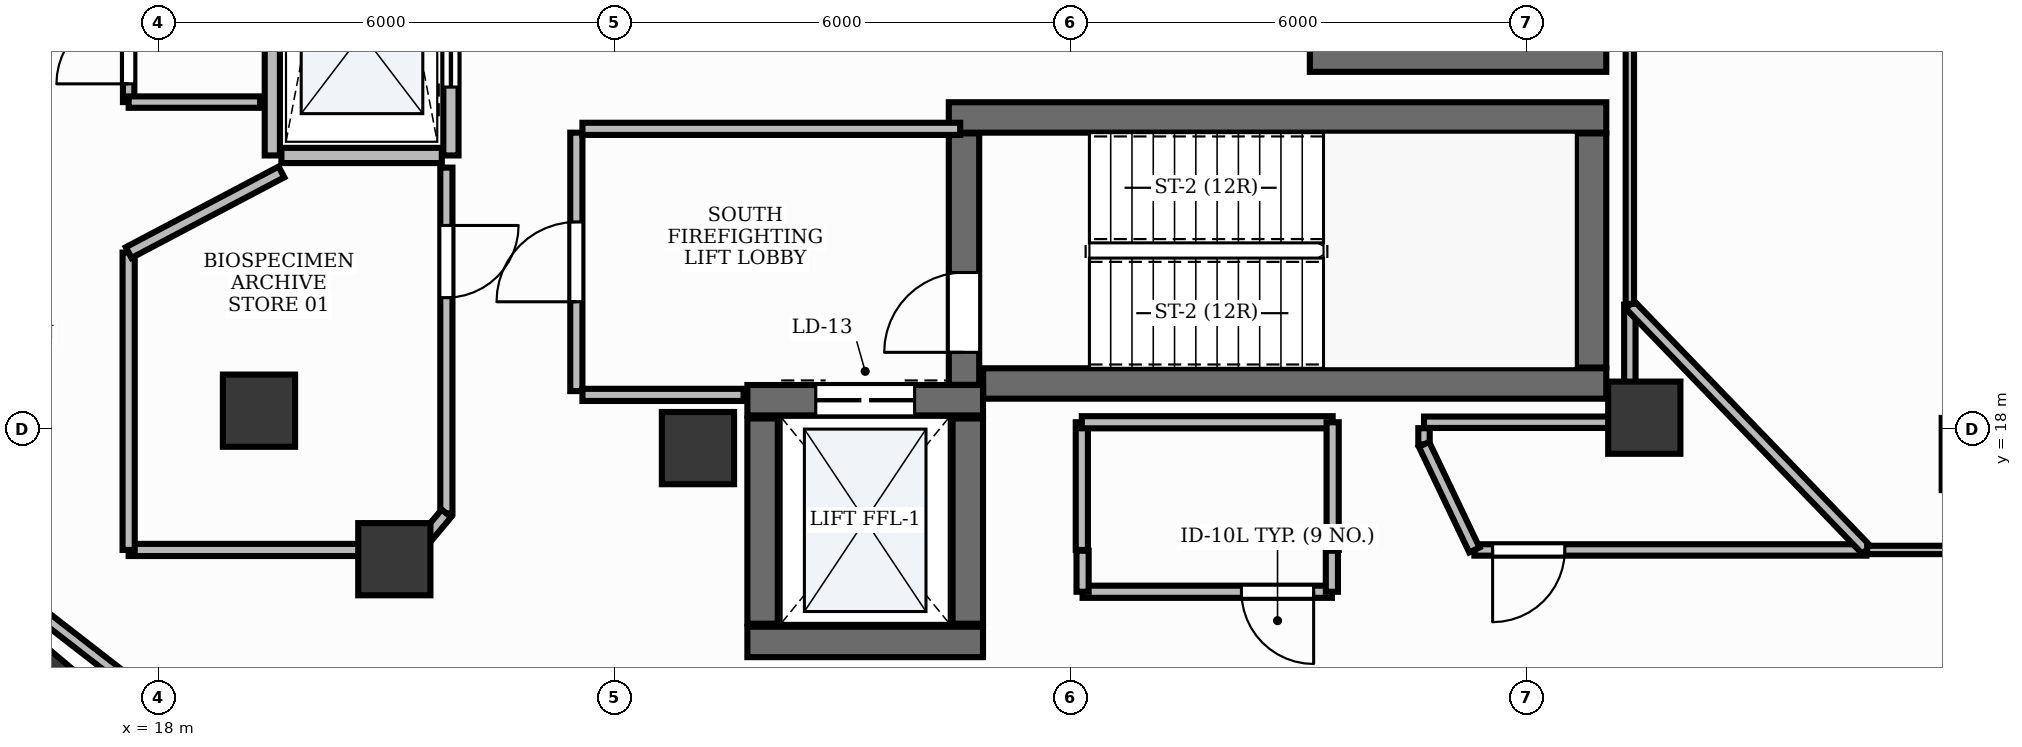
"""IFC4 building model, lengths in metres.
Left out: names, types, materials, properties, quantities, classifications, styles, units other than length and angle.
Written with IfcOpenShell. Run it as: python <this file> out.ifc"""

import sys

from ifc_helpers import new_model, si_unit, direction, frame, frame_2d, origin, origin_2d, place, context, subcontext, project, spatial, rectangle, extrude, element, fill, save


model = new_model("IFC4")
c1 = context("Model", 3, precision=1e-05, world=origin(), true_north=direction((0.0, 1.0)))
c2 = subcontext(c1, "Body", "Model", "MODEL_VIEW")
j1 = project(units=[si_unit("LENGTHUNIT", "METRE"), si_unit("PLANEANGLEUNIT", "RADIAN")], contexts=[c1])
p1 = place(None, origin())
s1 = spatial("IfcSite", under=j1, at=p1, CompositionType="ELEMENT")
p2 = place(p1, origin())
s2 = spatial("IfcBuilding", under=s1, at=p2, CompositionType="ELEMENT")
p3 = place(p2, frame((0.0, 0.0, 200.4)))
s3 = spatial("IfcBuildingStorey", under=s2, at=p3, CompositionType="ELEMENT", Elevation=200.4)
p4 = place(p3, frame((28.852, 18.6, 0.0), z_axis=(0.0, 0.0, 1.0), x_axis=(1.0, 0.0, 0.0)))
e1 = element("IfcWall", 1, at=p4, inside=s3, PredefinedType="SHEAR", context=c2, shape_type="SweptSolid", body=[
    extrude(rectangle(XDim=8.198, YDim=0.4, at=frame_2d((4.099, 0.0))), origin(), (0.0, 0.0, 1.0), 3.9),
])
p5 = place(p3, frame((28.4, 22.1, 0.0), z_axis=(0.0, 0.0, 1.0), x_axis=(1.0, 0.0, 0.0)))
e2 = element("IfcWall", 2, at=p5, inside=s3, PredefinedType="SHEAR", context=c2, shape_type="SweptSolid", body=[
    extrude(rectangle(XDim=8.65, YDim=0.4, at=frame_2d((4.325, 0.0))), origin(), (0.0, 0.0, 1.0), 3.9),
])
p6 = place(p3, frame((36.85, 18.81, 0.0), z_axis=(0.0, 0.0, 1.0), x_axis=(0.0, 1.0, 0.0)))
e3 = element("IfcWall", 3, at=p6, inside=s3, PredefinedType="SHEAR", context=c2, shape_type="SweptSolid", body=[
    extrude(rectangle(XDim=3.08, YDim=0.4, at=frame_2d((1.54, 0.0))), origin(), (0.0, 0.0, 1.0), 3.9),
])
p7 = place(p3, frame((28.6, 18.582, 0.0), z_axis=(0.0, 0.0, 1.0), x_axis=(0.0, 1.0, 0.0)))
e4 = element("IfcWall", 4, at=p7, inside=s3, PredefinedType="SHEAR", context=c2, shape_type="SweptSolid", body=[
    extrude(rectangle(XDim=3.308, YDim=0.4, at=frame_2d((1.654, 0.0))), origin(), (0.0, 0.0, 1.0), 3.9),
])
p8 = place(p7, frame((0.428, 0.0, 0.0)))
e5 = element("IfcOpeningElement", 5, at=p8, cuts=e4, PredefinedType="OPENING", context=c2, shape_type="SweptSolid", body=[
    extrude(rectangle(XDim=1.05, YDim=2.15, at=frame_2d((0.525, 1.075))), frame((0.0, 0.215, 0.0), z_axis=(0.0, -1.0, 0.0), x_axis=(1.0, 0.0, 0.0)), (0.0, 0.0, 1.0), 0.43),
])
p9 = place(p3, frame((33.15, 22.9, 0.0), z_axis=(0.0, 0.0, 1.0), x_axis=(1.0, 0.0, 0.0)))
e6 = element("IfcWall", 6, at=p9, inside=s3, PredefinedType="SHEAR", context=c2, shape_type="SweptSolid", body=[
    extrude(rectangle(XDim=3.9, YDim=0.4, at=frame_2d((1.95, 0.0))), origin(), (0.0, 0.0, 1.0), 3.9),
])
p10 = place(p3, frame((25.75, 15.2, 0.0), z_axis=(0.0, 0.0, 1.0), x_axis=(1.0, 0.0, 0.0)))
e7 = element("IfcWall", 7, at=p10, inside=s3, PredefinedType="SHEAR", context=c2, shape_type="SweptSolid", body=[
    extrude(rectangle(XDim=3.1, YDim=0.4, at=frame_2d((1.55, 0.0))), origin(), (0.0, 0.0, 1.0), 3.9),
])
p11 = place(p3, frame((25.75, 18.38, 0.0), z_axis=(0.0, 0.0, 1.0), x_axis=(1.0, 0.0, 0.0)))
e8 = element("IfcWall", 8, at=p11, inside=s3, PredefinedType="SHEAR", context=c2, shape_type="SweptSolid", body=[
    extrude(rectangle(XDim=3.1, YDim=0.4, at=frame_2d((1.55, 0.0))), origin(), (0.0, 0.0, 1.0), 3.9),
])
p12 = place(p11, frame((0.9, 0.0, 0.0)))
e9 = element("IfcOpeningElement", 9, at=p12, cuts=e8, PredefinedType="OPENING", context=c2, shape_type="SweptSolid", body=[
    extrude(rectangle(XDim=1.3, YDim=2.2, at=frame_2d((0.65, 1.1))), frame((0.0, 0.215, 0.0), z_axis=(0.0, -1.0, 0.0), x_axis=(1.0, 0.0, 0.0)), (0.0, 0.0, 1.0), 0.43),
])
for number, where, z_axis, x_axis in (
    (10, (25.95, 15.44, 0.0), (0.0, 0.0, 1.0), (0.0, 1.0, 0.0)),
    (11, (28.65, 15.44, 0.0), (0.0, 0.0, 1.0), (0.0, 1.0, 0.0)),
):
    element("IfcWall", number, at=place(p3, frame(where, z_axis=z_axis, x_axis=x_axis)), inside=s3, PredefinedType="SHEAR", context=c2, shape_type="SweptSolid", body=[
        extrude(rectangle(XDim=2.7, YDim=0.4, at=frame_2d((1.35, 0.0))), origin(), (0.0, 0.0, 1.0), 3.9),
    ])
for number, where, z_axis, x_axis in (
    (12, (25.1, 17.75, -0.0), (0.0, 0.0, 1.0), (1.0, 0.0, 0.0)),
    (13, (37.55, 18.15, -0.0), (0.0, 0.0, 1.0), (1.0, 0.0, 0.0)),
):
    element("IfcColumn", number, at=place(p3, frame(where, z_axis=z_axis, x_axis=x_axis)), inside=s3, PredefinedType="PILASTER", context=c2, shape_type="SweptSolid", body=[
        extrude(rectangle(XDim=0.95, YDim=0.95, at=origin_2d()), origin(), (0.0, 0.0, 1.0), 3.901),
    ])
p13 = place(p3, frame((19.325, 18.242, -0.0), z_axis=(0.0, 0.0, 1.0), x_axis=(1.0, 0.0, 0.0)))
e14 = element("IfcColumn", 14, at=p13, inside=s3, PredefinedType="COLUMN", context=c2, shape_type="SweptSolid", body=[
    extrude(rectangle(XDim=0.95, YDim=0.95, at=origin_2d()), origin(), (0.0, 0.0, 1.0), 3.901),
])
p14 = place(p3, frame((16.416, 14.573, -0.0), z_axis=(0.0, 0.0, 1.0), x_axis=(-0.764246456939, 0.644924300253, 0.0)))
e15 = element("IfcColumn", 15, at=p14, inside=s3, PredefinedType="COLUMN", context=c2, shape_type="SweptSolid", body=[
    extrude(rectangle(XDim=1.0, YDim=1.0, at=origin_2d()), origin(), (0.0, 0.0, 1.0), 3.901),
])
for number, where, z_axis, x_axis in (
    (16, (21.105, 16.288, -0.0), (0.0, 0.0, 1.0), (1.0, 0.0, 0.0)),
    (17, (41.938, 17.672, -0.0), (0.0, 0.0, 1.0), (1.0, 0.0, 0.0)),
):
    element("IfcColumn", number, at=place(p3, frame(where, z_axis=z_axis, x_axis=x_axis)), inside=s3, PredefinedType="COLUMN", context=c2, shape_type="SweptSolid", body=[
        extrude(rectangle(XDim=0.95, YDim=0.95, at=origin_2d()), origin(), (0.0, 0.0, 1.0), 3.901),
    ])
p15 = place(p3, frame((19.5, 21.6, 0.0), z_axis=(0.0, 0.0, 1.0), x_axis=(0.0, 1.0, 0.0)))
e18 = element("IfcWall", 18, at=p15, inside=s3, PredefinedType="PARTITIONING", context=c2, shape_type="SweptSolid", body=[
    extrude(rectangle(XDim=10.8, YDim=0.2, at=frame_2d((5.4, 0.0))), origin(), (0.0, 0.0, 1.0), 2.91),
])
p16 = place(p3, frame((21.85, 21.6, 0.0), z_axis=(0.0, 0.0, 1.0), x_axis=(0.0, 1.0, 0.0)))
e19 = element("IfcWall", 19, at=p16, inside=s3, PredefinedType="PARTITIONING", context=c2, shape_type="SweptSolid", body=[
    extrude(rectangle(XDim=10.8, YDim=0.2, at=frame_2d((5.4, 0.0))), origin(), (0.0, 0.0, 1.0), 2.91),
])
p17 = place(p16, frame((0.9, 0.0, 0.0)))
e20 = element("IfcOpeningElement", 20, at=p17, cuts=e19, PredefinedType="OPENING", context=c2, shape_type="SweptSolid", body=[
    extrude(rectangle(XDim=1.1, YDim=2.2, at=frame_2d((0.55, 1.1))), frame((0.0, 0.115, 0.0), z_axis=(0.0, -1.0, 0.0), x_axis=(1.0, 0.0, 0.0)), (0.0, 0.0, 1.0), 0.23),
])
p18 = place(p16, frame((3.6, 0.0, 0.0)))
e21 = element("IfcOpeningElement", 21, at=p18, cuts=e19, PredefinedType="OPENING", context=c2, shape_type="SweptSolid", body=[
    extrude(rectangle(XDim=1.1, YDim=2.2, at=frame_2d((0.55, 1.1))), frame((0.0, 0.115, 0.0), z_axis=(0.0, -1.0, 0.0), x_axis=(1.0, 0.0, 0.0)), (0.0, 0.0, 1.0), 0.23),
])
p19 = place(p16, frame((6.3, 0.0, 0.0)))
e22 = element("IfcOpeningElement", 22, at=p19, cuts=e19, PredefinedType="OPENING", context=c2, shape_type="SweptSolid", body=[
    extrude(rectangle(XDim=1.1, YDim=2.2, at=frame_2d((0.55, 1.1))), frame((0.0, 0.115, 0.0), z_axis=(0.0, -1.0, 0.0), x_axis=(1.0, 0.0, 0.0)), (0.0, 0.0, 1.0), 0.23),
])
p20 = place(p16, frame((9.0, 0.0, 0.0)))
e23 = element("IfcOpeningElement", 23, at=p20, cuts=e19, PredefinedType="OPENING", context=c2, shape_type="SweptSolid", body=[
    extrude(rectangle(XDim=1.1, YDim=2.2, at=frame_2d((0.55, 1.1))), frame((0.0, 0.115, 0.0), z_axis=(0.0, -1.0, 0.0), x_axis=(1.0, 0.0, 0.0)), (0.0, 0.0, 1.0), 0.23),
])
p21 = place(p3, frame((19.62, 21.6, 0.0), z_axis=(0.0, 0.0, 1.0), x_axis=(1.0, 0.0, 0.0)))
e24 = element("IfcWall", 24, at=p21, inside=s3, PredefinedType="PARTITIONING", context=c2, shape_type="SweptSolid", body=[
    extrude(rectangle(XDim=2.11, YDim=0.2, at=frame_2d((1.055, 0.0))), origin(), (0.0, 0.0, 1.0), 2.91),
])
p22 = place(p3, frame((23.5, 18.5, 0.0), z_axis=(0.0, 0.0, 1.0), x_axis=(0.0, 1.0, 0.0)))
e25 = element("IfcWall", 25, at=p22, inside=s3, PredefinedType="PARTITIONING", context=c2, shape_type="SweptSolid", body=[
    extrude(rectangle(XDim=3.4, YDim=0.16, at=frame_2d((1.7, 0.0))), origin(), (0.0, 0.0, 1.0), 2.91),
])
p23 = place(p22, frame((1.175, 0.0, 0.0)))
e26 = element("IfcOpeningElement", 26, at=p23, cuts=e25, PredefinedType="OPENING", context=c2, shape_type="SweptSolid", body=[
    extrude(rectangle(XDim=1.05, YDim=2.15, at=frame_2d((0.525, 1.075))), frame((0.0, 0.095, 0.0), z_axis=(0.0, -1.0, 0.0), x_axis=(1.0, 0.0, 0.0)), (0.0, 0.0, 1.0), 0.19),
])
p24 = place(p3, frame((23.58, 21.95, 0.0), z_axis=(0.0, 0.0, 1.0), x_axis=(1.0, 0.0, 0.0)))
e27 = element("IfcWall", 27, at=p24, inside=s3, PredefinedType="PARTITIONING", context=c2, shape_type="SweptSolid", body=[
    extrude(rectangle(XDim=4.97, YDim=0.16, at=frame_2d((2.485, 0.0))), origin(), (0.0, 0.0, 1.0), 2.91),
])
p25 = place(p3, frame((23.58, 18.45, 0.0), z_axis=(0.0, 0.0, 1.0), x_axis=(1.0, 0.0, 0.0)))
e28 = element("IfcWall", 28, at=p25, inside=s3, PredefinedType="PARTITIONING", context=c2, shape_type="SweptSolid", body=[
    extrude(rectangle(XDim=2.12, YDim=0.16, at=frame_2d((1.06, 0.0))), origin(), (0.0, 0.0, 1.0), 2.91),
])
p26 = place(p3, frame((33.44, 15.86, 0.0), z_axis=(0.0, 0.0, 1.0), x_axis=(-1.0, 0.0, 0.0)))
e29 = element("IfcWall", 29, at=p26, inside=s3, PredefinedType="PARTITIONING", context=c2, shape_type="SweptSolid", body=[
    extrude(rectangle(XDim=3.28, YDim=0.16, at=frame_2d((1.64, 0.0))), origin(), (0.0, 0.0, 1.0), 2.91),
])
p27 = place(p26, frame((0.24, 0.0, 0.0)))
e30 = element("IfcOpeningElement", 30, at=p27, cuts=e29, PredefinedType="OPENING", context=c2, shape_type="SweptSolid", body=[
    extrude(rectangle(XDim=0.95, YDim=2.15, at=frame_2d((0.475, 1.075))), frame((0.0, 0.095, 0.0), z_axis=(0.0, -1.0, 0.0), x_axis=(1.0, 0.0, 0.0)), (0.0, 0.0, 1.0), 0.19),
])
p28 = place(p3, frame((21.79, 21.44, 0.0), z_axis=(0.0, 0.0, 1.0), x_axis=(0.0, -1.0, 0.0)))
e31 = element("IfcWall", 31, at=p28, inside=s3, PredefinedType="PARTITIONING", context=c2, shape_type="SweptSolid", body=[
    extrude(rectangle(XDim=4.549, YDim=0.16, at=frame_2d((2.274, 0.0))), origin(), (0.0, 0.0, 1.0), 2.91),
])
p29 = place(p28, frame((0.761, 0.0, 0.0)))
e32 = element("IfcOpeningElement", 32, at=p29, cuts=e31, PredefinedType="OPENING", context=c2, shape_type="SweptSolid", body=[
    extrude(rectangle(XDim=0.95, YDim=2.15, at=frame_2d((0.475, 1.075))), frame((0.0, 0.095, 0.0), z_axis=(0.0, -1.0, 0.0), x_axis=(1.0, 0.0, 0.0)), (0.0, 0.0, 1.0), 0.19),
])
p30 = place(p3, frame((40.472, 16.41, 0.0), z_axis=(0.0, 0.0, 1.0), x_axis=(-1.0, 0.0, 0.0)))
e33 = element("IfcWall", 33, at=p30, inside=s3, PredefinedType="PARTITIONING", context=c2, shape_type="SweptSolid", body=[
    extrude(rectangle(XDim=5.157, YDim=0.15, at=frame_2d((2.579, 0.0))), origin(), (0.0, 0.0, 1.0), 2.91),
])
p31 = place(p30, frame((3.968, 0.0, 0.0)))
e34 = element("IfcOpeningElement", 34, at=p31, cuts=e33, PredefinedType="OPENING", context=c2, shape_type="SweptSolid", body=[
    extrude(rectangle(XDim=0.95, YDim=2.15, at=frame_2d((0.475, 1.075))), frame((0.0, 0.09, 0.0), z_axis=(0.0, -1.0, 0.0), x_axis=(1.0, 0.0, 0.0)), (0.0, 0.0, 1.0), 0.18),
])
p32 = place(p3, frame((17.61, 22.302, 0.0), z_axis=(0.0, 0.0, 1.0), x_axis=(0.0, 1.0, 0.0)))
e35 = element("IfcWall", 35, at=p32, inside=s3, PredefinedType="PARTITIONING", context=c2, shape_type="SweptSolid", body=[
    extrude(rectangle(XDim=9.488, YDim=0.15, at=frame_2d((4.744, 0.0))), origin(), (0.0, 0.0, 1.0), 2.91),
])
p33 = place(p32, frame((0.24, 0.0, 0.0)))
e36 = element("IfcOpeningElement", 36, at=p33, cuts=e35, PredefinedType="OPENING", context=c2, shape_type="SweptSolid", body=[
    extrude(rectangle(XDim=0.95, YDim=2.15, at=frame_2d((0.475, 1.075))), frame((0.0, 0.09, 0.0), z_axis=(0.0, -1.0, 0.0), x_axis=(1.0, 0.0, 0.0)), (0.0, 0.0, 1.0), 0.18),
])
for number, where, z_axis, x_axis in (
    (37, (33.44, 16.4, 0.0), (0.0, 0.0, 1.0), (0.0, -1.0, 0.0)),
    (38, (30.16, 15.86, 0.0), (0.0, 0.0, 1.0), (0.0, 1.0, 0.0)),
):
    element("IfcWall", number, at=place(p3, frame(where, z_axis=z_axis, x_axis=x_axis)), inside=s3, PredefinedType="PARTITIONING", context=c2, shape_type="SweptSolid", body=[
        extrude(rectangle(XDim=0.54, YDim=0.16, at=frame_2d((0.27, 0.0))), origin(), (0.0, 0.0, 1.0), 2.91),
    ])
p34 = place(p3, frame((30.15, 16.41, 0.0), z_axis=(0.0, 0.0, 1.0), x_axis=(0.0, 1.0, 0.0)))
e39 = element("IfcWall", 39, at=p34, inside=s3, PredefinedType="PARTITIONING", context=c2, shape_type="SweptSolid", body=[
    extrude(rectangle(XDim=1.68, YDim=0.16, at=frame_2d((0.84, 0.0))), origin(), (0.0, 0.0, 1.0), 2.91),
])
p35 = place(p3, frame((30.15, 18.09, 0.0), z_axis=(0.0, 0.0, 1.0), x_axis=(1.0, 0.0, 0.0)))
e40 = element("IfcWall", 40, at=p35, inside=s3, PredefinedType="PARTITIONING", context=c2, shape_type="SweptSolid", body=[
    extrude(rectangle(XDim=3.3, YDim=0.16, at=frame_2d((1.65, 0.0))), origin(), (0.0, 0.0, 1.0), 2.91),
])
p36 = place(p3, frame((33.45, 18.09, 0.0), z_axis=(0.0, 0.0, 1.0), x_axis=(0.0, -1.0, 0.0)))
e41 = element("IfcWall", 41, at=p36, inside=s3, PredefinedType="PARTITIONING", context=c2, shape_type="SweptSolid", body=[
    extrude(rectangle(XDim=1.68, YDim=0.16, at=frame_2d((0.84, 0.0))), origin(), (0.0, 0.0, 1.0), 2.91),
])
p37 = place(p3, frame((21.79, 16.891, 0.0), z_axis=(0.0, 0.0, 1.0), x_axis=(-0.6421333912, -0.766592921899, 0.0)))
e42 = element("IfcWall", 42, at=p37, inside=s3, PredefinedType="PARTITIONING", context=c2, shape_type="SweptSolid", body=[
    extrude(rectangle(XDim=0.628, YDim=0.16, at=frame_2d((0.314, 0.0))), origin(), (0.0, 0.0, 1.0), 2.91),
])
p38 = place(p3, frame((21.387, 16.41, 0.0), z_axis=(0.0, 0.0, 1.0), x_axis=(-1.0, 0.0, 0.0)))
e43 = element("IfcWall", 43, at=p38, inside=s3, PredefinedType="PARTITIONING", context=c2, shape_type="SweptSolid", body=[
    extrude(rectangle(XDim=3.777, YDim=0.16, at=frame_2d((1.888, 0.0))), origin(), (0.0, 0.0, 1.0), 2.91),
])
p39 = place(p3, frame((17.61, 16.41, 0.0), z_axis=(0.0, 0.0, 1.0), x_axis=(0.0, 1.0, 0.0)))
e44 = element("IfcWall", 44, at=p39, inside=s3, PredefinedType="PARTITIONING", context=c2, shape_type="SweptSolid", body=[
    extrude(rectangle(XDim=3.912, YDim=0.16, at=frame_2d((1.956, 0.0))), origin(), (0.0, 0.0, 1.0), 2.91),
])
p40 = place(p3, frame((17.61, 20.322, 0.0), z_axis=(0.0, 0.0, 1.0), x_axis=(0.884437714556, 0.466658257261, 0.0)))
e45 = element("IfcWall", 45, at=p40, inside=s3, PredefinedType="PARTITIONING", context=c2, shape_type="SweptSolid", body=[
    extrude(rectangle(XDim=2.273, YDim=0.16, at=frame_2d((1.136, 0.0))), origin(), (0.0, 0.0, 1.0), 2.91),
])
p41 = place(p3, frame((16.476, 15.551, 0.0), z_axis=(0.0, 0.0, 1.0), x_axis=(0.790344529681, -0.612662651386, 0.0)))
e46 = element("IfcWall", 46, at=p41, inside=s3, PredefinedType="PARTITIONING", context=c2, shape_type="SweptSolid", body=[
    extrude(rectangle(XDim=2.514, YDim=0.15, at=frame_2d((1.257, 0.0))), origin(), (0.0, 0.0, 1.0), 2.91),
])
p42 = place(p3, frame((34.652, 17.799, 0.0), z_axis=(0.0, 0.0, 1.0), x_axis=(0.0, 1.0, 0.0)))
e47 = element("IfcWall", 47, at=p42, inside=s3, PredefinedType="PARTITIONING", context=c2, shape_type="SweptSolid", body=[
    extrude(rectangle(XDim=0.213, YDim=0.15, at=frame_2d((0.106, 0.0))), origin(), (0.0, 0.0, 1.0), 2.91),
])
p43 = place(p3, frame((34.652, 18.09, 0.0), z_axis=(0.0, 0.0, 1.0), x_axis=(1.0, 0.0, 0.0)))
e48 = element("IfcWall", 48, at=p43, inside=s3, PredefinedType="PARTITIONING", context=c2, shape_type="SweptSolid", body=[
    extrude(rectangle(XDim=2.698, YDim=0.15, at=frame_2d((1.349, 0.0))), origin(), (0.0, 0.0, 1.0), 2.91),
])
p44 = place(p3, frame((37.36, 18.1, 0.0), z_axis=(0.0, 0.0, 1.0), x_axis=(0.0, 1.0, 0.0)))
e49 = element("IfcWall", 49, at=p44, inside=s3, PredefinedType="PARTITIONING", context=c2, shape_type="SweptSolid", body=[
    extrude(rectangle(XDim=1.537, YDim=0.15, at=frame_2d((0.769, 0.0))), origin(), (0.0, 0.0, 1.0), 2.91),
])
p45 = place(p3, frame((37.36, 19.637, 0.0), z_axis=(0.0, 0.0, 1.0), x_axis=(0.694165803971, -0.719815140573, 0.0)))
e50 = element("IfcWall", 50, at=p45, inside=s3, PredefinedType="PARTITIONING", context=c2, shape_type="SweptSolid", body=[
    extrude(rectangle(XDim=4.483, YDim=0.15, at=frame_2d((2.242, 0.0))), origin(), (0.0, 0.0, 1.0), 2.91),
])
p46 = place(p3, frame((35.315, 16.41, 0.0), z_axis=(0.0, 0.0, 1.0), x_axis=(-0.430450657863, 0.902614109764, 0.0)))
e51 = element("IfcWall", 51, at=p46, inside=s3, PredefinedType="PARTITIONING", context=c2, shape_type="SweptSolid", body=[
    extrude(rectangle(XDim=1.539, YDim=0.15, at=frame_2d((0.77, 0.0))), origin(), (0.0, 0.0, 1.0), 2.91),
])
p47 = place(p3, frame((44.5, 16.41, 0.0), z_axis=(0.0, 0.0, 1.0), x_axis=(-1.0, 0.0, 0.0)))
e52 = element("IfcWall", 52, at=p47, inside=s3, PredefinedType="MOVABLE", context=c2, shape_type="SweptSolid", body=[
    extrude(rectangle(XDim=4.018, YDim=0.11, at=frame_2d((2.009, 0.0))), origin(), (0.0, 0.0, 1.0), 2.91),
])
p48 = place(p3, frame((37.36, 19.647, 0.0), z_axis=(0.0, 0.0, 1.0), x_axis=(0.0, 1.0, 0.0)))
e53 = element("IfcWall", 53, at=p48, inside=s3, PredefinedType="MOVABLE", context=c2, shape_type="SweptSolid", body=[
    extrude(rectangle(XDim=8.465, YDim=0.11, at=frame_2d((4.232, 0.0))), origin(), (0.0, 0.0, 1.0), 2.91),
])
p49 = place(p3, frame((19.34, 22.302, 0.0), z_axis=(0.0, 0.0, 1.0), x_axis=(-1.0, 0.0, 0.0)))
e54 = element("IfcWall", 54, at=p49, inside=s3, PredefinedType="PARTITIONING", context=c2, shape_type="SweptSolid", body=[
    extrude(rectangle(XDim=1.73, YDim=0.15, at=frame_2d((0.865, 0.0))), origin(), (0.0, 0.0, 1.0), 2.91),
])
p50 = place(p8, origin())
e55 = element("IfcDoor", 55, at=p50, inside=s3, OperationType="SINGLE_SWING_LEFT", PredefinedType="DOOR", context=c2, shape_type="SweptSolid", body=[
    extrude(rectangle(XDim=1.05, YDim=2.15, at=frame_2d((0.525, 1.075))), frame((0.0, 0.025, 0.0), z_axis=(0.0, -1.0, 0.0), x_axis=(1.0, 0.0, 0.0)), (0.0, 0.0, 1.0), 0.05),
])
fill(e5, e55)
p51 = place(p17, origin())
e56 = element("IfcDoor", 56, at=p51, inside=s3, OperationType="DOUBLE_DOOR_SLIDING", PredefinedType="DOOR", context=c2, shape_type="SweptSolid", body=[
    extrude(rectangle(XDim=1.1, YDim=2.2, at=frame_2d((0.55, 1.1))), frame((0.0, 0.025, 0.0), z_axis=(0.0, -1.0, 0.0), x_axis=(1.0, 0.0, 0.0)), (0.0, 0.0, 1.0), 0.05),
])
fill(e20, e56)
p52 = place(p12, origin())
e57 = element("IfcDoor", 57, at=p52, inside=s3, OperationType="DOUBLE_DOOR_SLIDING", PredefinedType="DOOR", context=c2, shape_type="SweptSolid", body=[
    extrude(rectangle(XDim=1.3, YDim=2.2, at=frame_2d((0.65, 1.1))), frame((0.0, 0.025, 0.0), z_axis=(0.0, -1.0, 0.0), x_axis=(1.0, 0.0, 0.0)), (0.0, 0.0, 1.0), 0.05),
])
fill(e9, e57)
p53 = place(p23, origin())
e58 = element("IfcDoor", 58, at=p53, inside=s3, OperationType="SINGLE_SWING_LEFT", PredefinedType="DOOR", context=c2, shape_type="SweptSolid", body=[
    extrude(rectangle(XDim=1.05, YDim=2.15, at=frame_2d((0.525, 1.075))), frame((0.0, 0.025, 0.0), z_axis=(0.0, -1.0, 0.0), x_axis=(1.0, 0.0, 0.0)), (0.0, 0.0, 1.0), 0.05),
])
fill(e26, e58)
p54 = place(p27, origin())
e59 = element("IfcDoor", 59, at=p54, inside=s3, OperationType="SINGLE_SWING_LEFT", PredefinedType="DOOR", context=c2, shape_type="SweptSolid", body=[
    extrude(rectangle(XDim=0.95, YDim=2.15, at=frame_2d((0.475, 1.075))), frame((0.0, 0.025, 0.0), z_axis=(0.0, -1.0, 0.0), x_axis=(1.0, 0.0, 0.0)), (0.0, 0.0, 1.0), 0.05),
])
fill(e30, e59)
p55 = place(p29, origin())
e60 = element("IfcDoor", 60, at=p55, inside=s3, OperationType="SINGLE_SWING_LEFT", PredefinedType="DOOR", context=c2, shape_type="SweptSolid", body=[
    extrude(rectangle(XDim=0.95, YDim=2.15, at=frame_2d((0.475, 1.075))), frame((0.0, 0.025, 0.0), z_axis=(0.0, -1.0, 0.0), x_axis=(1.0, 0.0, 0.0)), (0.0, 0.0, 1.0), 0.05),
])
fill(e32, e60)
p56 = place(p31, origin())
e61 = element("IfcDoor", 61, at=p56, inside=s3, OperationType="SINGLE_SWING_RIGHT", PredefinedType="DOOR", context=c2, shape_type="SweptSolid", body=[
    extrude(rectangle(XDim=0.95, YDim=2.15, at=frame_2d((0.475, 1.075))), frame((0.0, 0.025, 0.0), z_axis=(0.0, -1.0, 0.0), x_axis=(1.0, 0.0, 0.0)), (0.0, 0.0, 1.0), 0.05),
])
fill(e34, e61)
p57 = place(p33, origin())
e62 = element("IfcDoor", 62, at=p57, inside=s3, OperationType="SINGLE_SWING_LEFT", PredefinedType="DOOR", context=c2, shape_type="SweptSolid", body=[
    extrude(rectangle(XDim=0.95, YDim=2.15, at=frame_2d((0.475, 1.075))), frame((0.0, 0.025, 0.0), z_axis=(0.0, -1.0, 0.0), x_axis=(1.0, 0.0, 0.0)), (0.0, 0.0, 1.0), 0.05),
])
fill(e36, e62)
save(model, sys.argv[1])
